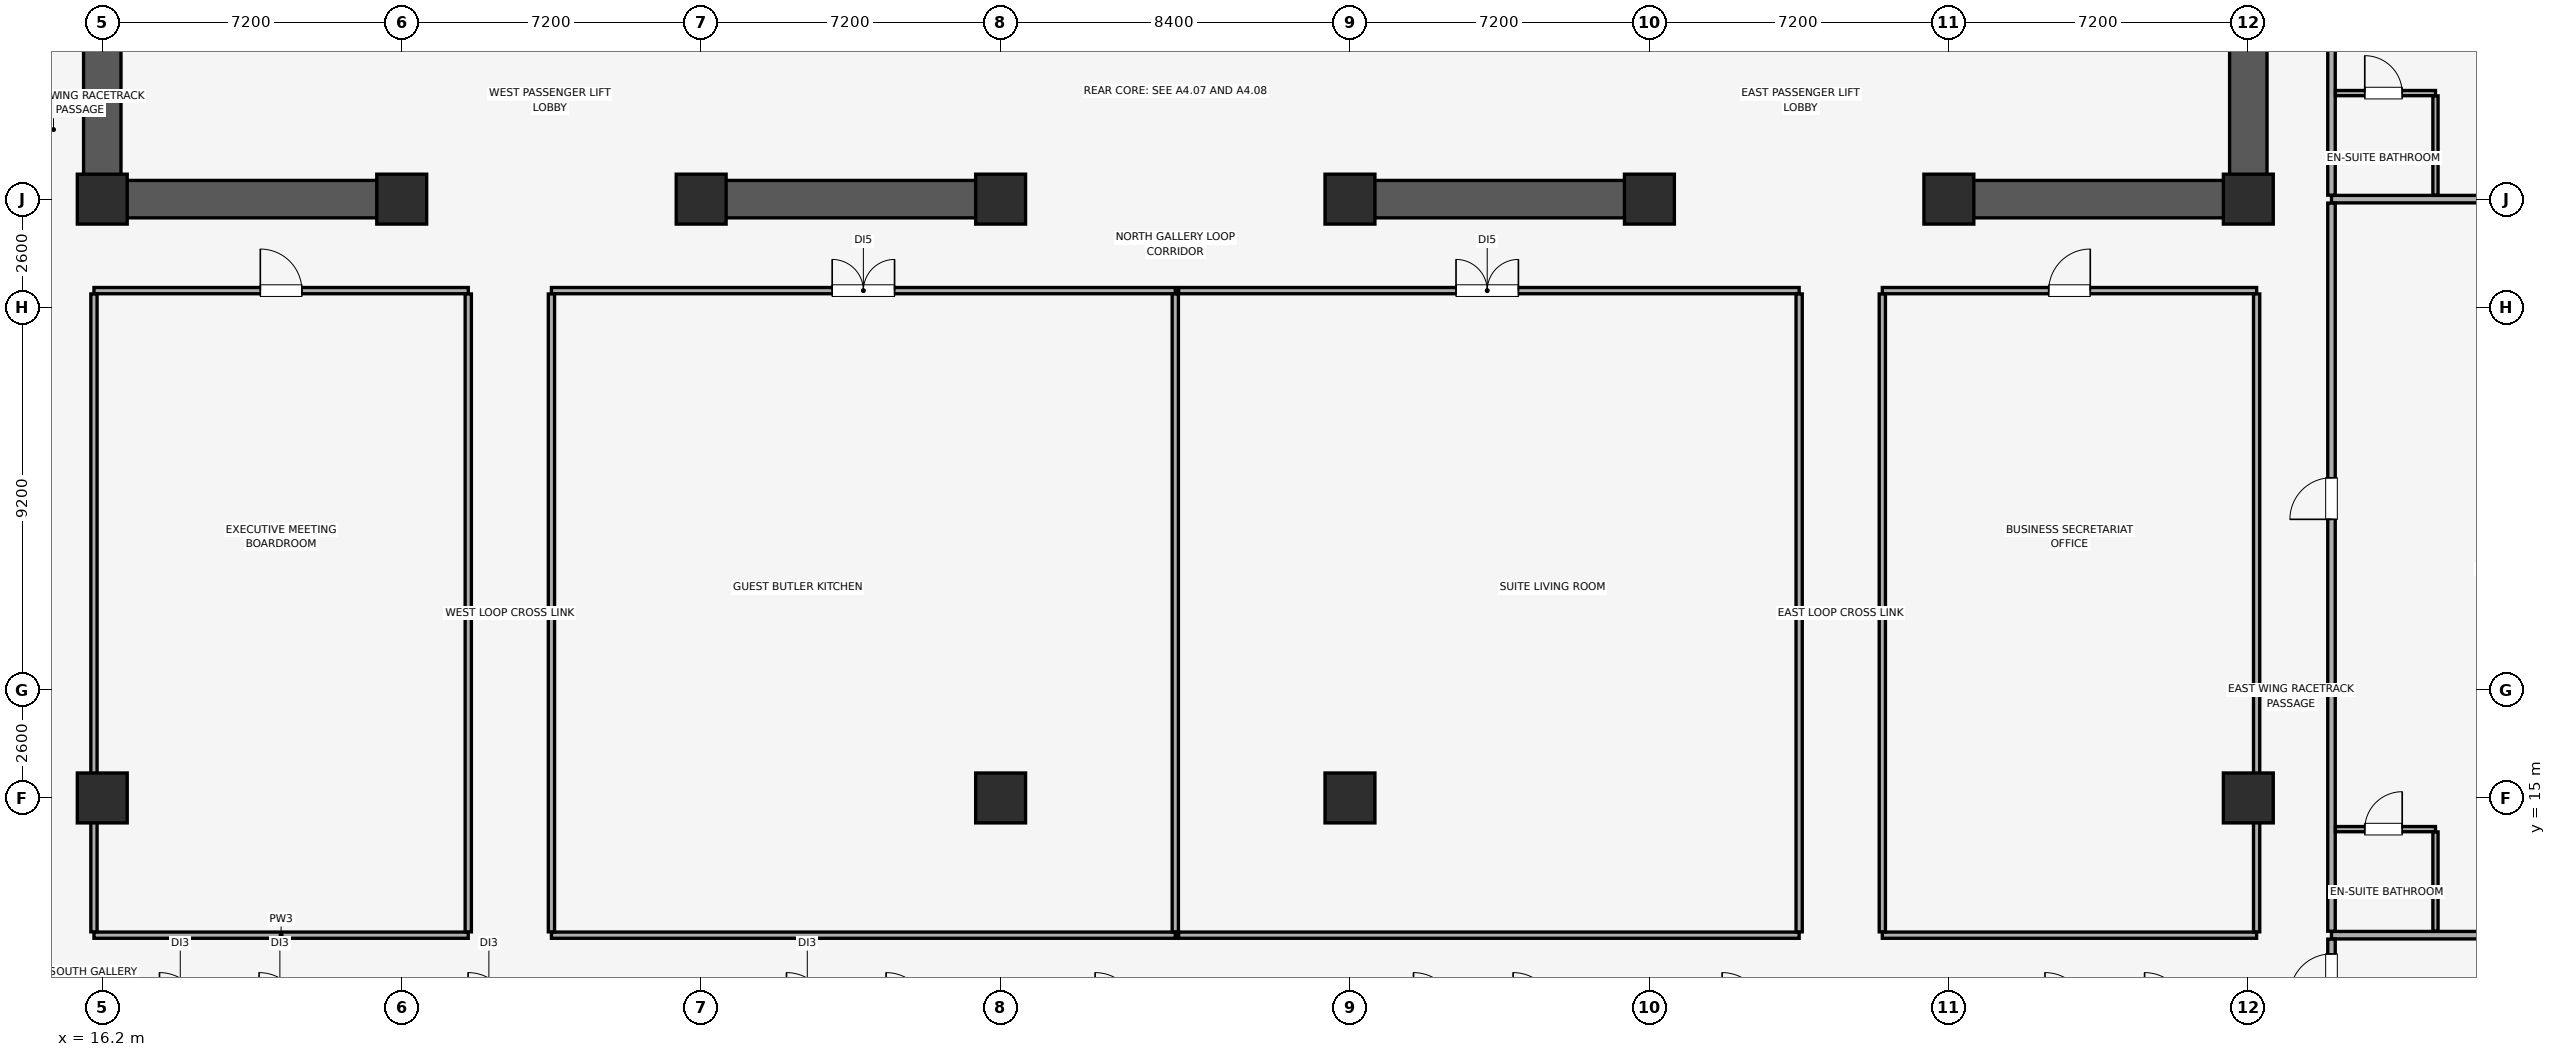
"""IFC4 building model, lengths in metres.
Left out: names, types, materials, properties, quantities, classifications, styles, units other than length and angle.
Written with IfcOpenShell. Run it as: python <this file> out.ifc"""

import sys

from ifc_helpers import new_model, si_unit, direction, frame, frame_2d, origin, origin_2d, place, context, subcontext, project, spatial, rectangle, extrude, element, fill, save


model = new_model("IFC4")
c1 = context("Model", 3, precision=1e-05, world=origin(), true_north=direction((0.0, 1.0)))
c2 = subcontext(c1, "Body", "Model", "MODEL_VIEW")
j1 = project(units=[si_unit("LENGTHUNIT", "METRE"), si_unit("PLANEANGLEUNIT", "RADIAN")], contexts=[c1])
p1 = place(None, origin())
s1 = spatial("IfcSite", under=j1, at=p1, CompositionType="ELEMENT")
p2 = place(p1, origin())
s2 = spatial("IfcBuilding", under=s1, at=p2, CompositionType="ELEMENT")
p3 = place(p2, frame((0.0, 0.0, 135.35)))
s3 = spatial("IfcBuildingStorey", under=s2, at=p3, CompositionType="ELEMENT", Elevation=135.35)
for number, where, z_axis, x_axis in (
    (1, (16.2, 15.0, 0.0), (0.0, 0.0, 1.0), (1.0, 0.0, 0.0)),
    (2, (37.8, 15.0, 0.0), (0.0, 0.0, 1.0), (1.0, 0.0, 0.0)),
    (3, (46.2, 15.0, 0.0), (0.0, 0.0, 1.0), (1.0, 0.0, 0.0)),
    (4, (67.8, 15.0, 0.0), (0.0, 0.0, 1.0), (1.0, 0.0, 0.0)),
    (5, (16.2, 29.4, 0.0), (0.0, 0.0, 1.0), (1.0, 0.0, 0.0)),
    (6, (23.4, 29.4, 0.0), (0.0, 0.0, 1.0), (1.0, 0.0, 0.0)),
    (7, (30.6, 29.4, 0.0), (0.0, 0.0, 1.0), (1.0, 0.0, 0.0)),
    (8, (37.8, 29.4, 0.0), (0.0, 0.0, 1.0), (1.0, 0.0, 0.0)),
    (9, (46.2, 29.4, 0.0), (0.0, 0.0, 1.0), (1.0, 0.0, 0.0)),
    (10, (53.4, 29.4, 0.0), (0.0, 0.0, 1.0), (1.0, 0.0, 0.0)),
    (11, (60.6, 29.4, 0.0), (0.0, 0.0, 1.0), (1.0, 0.0, 0.0)),
    (12, (67.8, 29.4, 0.0), (0.0, 0.0, 1.0), (1.0, 0.0, 0.0)),
):
    element("IfcColumn", number, at=place(p3, frame(where, z_axis=z_axis, x_axis=x_axis)), inside=s3, PredefinedType="COLUMN", context=c2, shape_type="SweptSolid", body=[
        extrude(rectangle(XDim=1.2, YDim=1.2, at=origin_2d()), origin(), (0.0, 0.0, 1.0), 3.56),
    ])
for number, where, z_axis, x_axis in (
    (13, (16.2, 29.4, 0.0), (0.0, 0.0, 1.0), (0.0, 1.0, 0.0)),
    (14, (67.8, 29.4, 0.0), (0.0, 0.0, 1.0), (0.0, 1.0, 0.0)),
):
    element("IfcWall", number, at=place(p3, frame(where, z_axis=z_axis, x_axis=x_axis)), inside=s3, PredefinedType="SHEAR", context=c2, shape_type="SweptSolid", body=[
        extrude(rectangle(XDim=19.2, YDim=0.9, at=frame_2d((9.6, 0.0))), origin(), (0.0, 0.0, 1.0), 3.56),
    ])
p4 = place(p3, frame((16.655, 29.4, 0.0), z_axis=(0.0, 0.0, 1.0), x_axis=(1.0, 0.0, 0.0)))
e15 = element("IfcWall", 15, at=p4, inside=s3, PredefinedType="SHEAR", context=c2, shape_type="SweptSolid", body=[
    extrude(rectangle(XDim=6.945, YDim=0.9, at=frame_2d((3.473, 0.0))), origin(), (0.0, 0.0, 1.0), 3.56),
])
for number, where, z_axis, x_axis in (
    (16, (30.4, 29.4, 0.0), (0.0, 0.0, 1.0), (1.0, 0.0, 0.0)),
    (17, (46.0, 29.4, 0.0), (0.0, 0.0, 1.0), (1.0, 0.0, 0.0)),
):
    element("IfcWall", number, at=place(p3, frame(where, z_axis=z_axis, x_axis=x_axis)), inside=s3, PredefinedType="SHEAR", context=c2, shape_type="SweptSolid", body=[
        extrude(rectangle(XDim=7.6, YDim=0.9, at=frame_2d((3.8, 0.0))), origin(), (0.0, 0.0, 1.0), 3.56),
    ])
p5 = place(p3, frame((60.4, 29.4, 0.0), z_axis=(0.0, 0.0, 1.0), x_axis=(1.0, 0.0, 0.0)))
e18 = element("IfcWall", 18, at=p5, inside=s3, PredefinedType="SHEAR", context=c2, shape_type="SweptSolid", body=[
    extrude(rectangle(XDim=6.945, YDim=0.9, at=frame_2d((3.473, 0.0))), origin(), (0.0, 0.0, 1.0), 3.56),
])
p6 = place(p3, frame((69.8, 11.7, 0.0), z_axis=(0.0, 0.0, 1.0), x_axis=(1.0, 0.0, 0.0)))
e19 = element("IfcWall", 19, at=p6, inside=s3, PredefinedType="PARTITIONING", context=c2, shape_type="SweptSolid", body=[
    extrude(rectangle(XDim=11.05, YDim=0.18, at=frame_2d((5.525, 0.0))), origin(), (0.0, 0.0, 1.0), 3.56),
])
p7 = place(p3, frame((69.8, 9.895, 0.0), z_axis=(0.0, 0.0, 1.0), x_axis=(0.0, 1.0, 0.0)))
e20 = element("IfcWall", 20, at=p7, inside=s3, PredefinedType="PARTITIONING", context=c2, shape_type="SweptSolid", body=[
    extrude(rectangle(XDim=1.71, YDim=0.18, at=frame_2d((0.855, 0.0))), origin(), (0.0, 0.0, 1.0), 3.56),
])
p8 = place(p7, frame((0.355, 0.0, 0.0)))
e21 = element("IfcOpeningElement", 21, at=p8, cuts=e20, PredefinedType="OPENING", context=c2, shape_type="SweptSolid", body=[
    extrude(rectangle(XDim=1.0, YDim=2.15, at=frame_2d((0.5, 1.075))), frame((0.0, 0.1, 0.0), z_axis=(0.0, -1.0, 0.0), x_axis=(1.0, 0.0, 0.0)), (0.0, 0.0, 1.0), 0.2),
])
p9 = place(p3, frame((69.8, 29.4, 0.0), z_axis=(0.0, 0.0, 1.0), x_axis=(1.0, 0.0, 0.0)))
e22 = element("IfcWall", 22, at=p9, inside=s3, PredefinedType="PARTITIONING", context=c2, shape_type="SweptSolid", body=[
    extrude(rectangle(XDim=11.05, YDim=0.18, at=frame_2d((5.525, 0.0))), origin(), (0.0, 0.0, 1.0), 2.91),
])
p10 = place(p3, frame((69.8, 11.795, 0.0), z_axis=(0.0, 0.0, 1.0), x_axis=(0.0, 1.0, 0.0)))
e23 = element("IfcWall", 23, at=p10, inside=s3, PredefinedType="PARTITIONING", context=c2, shape_type="SweptSolid", body=[
    extrude(rectangle(XDim=17.51, YDim=0.18, at=frame_2d((8.755, 0.0))), origin(), (0.0, 0.0, 1.0), 3.56),
])
p11 = place(p10, frame((9.905, 0.0, 0.0)))
e24 = element("IfcOpeningElement", 24, at=p11, cuts=e23, PredefinedType="OPENING", context=c2, shape_type="SweptSolid", body=[
    extrude(rectangle(XDim=1.0, YDim=2.15, at=frame_2d((0.5, 1.075))), frame((0.0, 0.1, 0.0), z_axis=(0.0, -1.0, 0.0), x_axis=(1.0, 0.0, 0.0)), (0.0, 0.0, 1.0), 0.2),
])
p12 = place(p3, frame((69.895, 14.25, 0.0), z_axis=(0.0, 0.0, 1.0), x_axis=(1.0, 0.0, 0.0)))
e25 = element("IfcWall", 25, at=p12, inside=s3, PredefinedType="PARTITIONING", context=c2, shape_type="SweptSolid", body=[
    extrude(rectangle(XDim=2.405, YDim=0.125, at=frame_2d((1.203, 0.0))), origin(), (0.0, 0.0, 1.0), 3.56),
])
p13 = place(p12, frame((0.705, 0.0, 0.0)))
e26 = element("IfcOpeningElement", 26, at=p13, cuts=e25, PredefinedType="OPENING", context=c2, shape_type="SweptSolid", body=[
    extrude(rectangle(XDim=0.9, YDim=2.1, at=frame_2d((0.45, 1.05))), frame((0.0, 0.073, 0.0), z_axis=(0.0, -1.0, 0.0), x_axis=(1.0, 0.0, 0.0)), (0.0, 0.0, 1.0), 0.145),
])
p14 = place(p3, frame((72.3, 11.795, 0.0), z_axis=(0.0, 0.0, 1.0), x_axis=(0.0, 1.0, 0.0)))
e27 = element("IfcWall", 27, at=p14, inside=s3, PredefinedType="PARTITIONING", context=c2, shape_type="SweptSolid", body=[
    extrude(rectangle(XDim=2.388, YDim=0.125, at=frame_2d((1.194, 0.0))), origin(), (0.0, 0.0, 1.0), 3.56),
])
p15 = place(p3, frame((16.0, 11.7, 0.0), z_axis=(0.0, 0.0, 1.0), x_axis=(1.0, 0.0, 0.0)))
e28 = element("IfcWall", 28, at=p15, inside=s3, PredefinedType="PARTITIONING", context=c2, shape_type="SweptSolid", body=[
    extrude(rectangle(XDim=9.0, YDim=0.15, at=frame_2d((4.5, 0.0))), origin(), (0.0, 0.0, 1.0), 3.56),
])
p16 = place(p3, frame((16.0, 27.2, 0.0), z_axis=(0.0, 0.0, 1.0), x_axis=(1.0, 0.0, 0.0)))
e29 = element("IfcWall", 29, at=p16, inside=s3, PredefinedType="PARTITIONING", context=c2, shape_type="SweptSolid", body=[
    extrude(rectangle(XDim=9.0, YDim=0.15, at=frame_2d((4.5, 0.0))), origin(), (0.0, 0.0, 1.0), 3.56),
])
p17 = place(p16, frame((4.0, 0.0, 0.0)))
e30 = element("IfcOpeningElement", 30, at=p17, cuts=e29, PredefinedType="OPENING", context=c2, shape_type="SweptSolid", body=[
    extrude(rectangle(XDim=1.0, YDim=2.15, at=frame_2d((0.5, 1.075))), frame((0.0, 0.085, 0.0), z_axis=(0.0, -1.0, 0.0), x_axis=(1.0, 0.0, 0.0)), (0.0, 0.0, 1.0), 0.17),
])
p18 = place(p3, frame((16.0, 11.78, 0.0), z_axis=(0.0, 0.0, 1.0), x_axis=(0.0, 1.0, 0.0)))
e31 = element("IfcWall", 31, at=p18, inside=s3, PredefinedType="PARTITIONING", context=c2, shape_type="SweptSolid", body=[
    extrude(rectangle(XDim=15.34, YDim=0.15, at=frame_2d((7.67, 0.0))), origin(), (0.0, 0.0, 1.0), 3.01),
])
p19 = place(p3, frame((25.0, 11.78, 0.0), z_axis=(0.0, 0.0, 1.0), x_axis=(0.0, 1.0, 0.0)))
e32 = element("IfcWall", 32, at=p19, inside=s3, PredefinedType="PARTITIONING", context=c2, shape_type="SweptSolid", body=[
    extrude(rectangle(XDim=15.34, YDim=0.15, at=frame_2d((7.67, 0.0))), origin(), (0.0, 0.0, 1.0), 3.56),
])
p20 = place(p3, frame((27.0, 11.7, 0.0), z_axis=(0.0, 0.0, 1.0), x_axis=(1.0, 0.0, 0.0)))
e33 = element("IfcWall", 33, at=p20, inside=s3, PredefinedType="PARTITIONING", context=c2, shape_type="SweptSolid", body=[
    extrude(rectangle(XDim=15.0, YDim=0.15, at=frame_2d((7.5, 0.0))), origin(), (0.0, 0.0, 1.0), 3.56),
])
p21 = place(p3, frame((27.0, 27.2, 0.0), z_axis=(0.0, 0.0, 1.0), x_axis=(1.0, 0.0, 0.0)))
e34 = element("IfcWall", 34, at=p21, inside=s3, PredefinedType="PARTITIONING", context=c2, shape_type="SweptSolid", body=[
    extrude(rectangle(XDim=15.0, YDim=0.15, at=frame_2d((7.5, 0.0))), origin(), (0.0, 0.0, 1.0), 3.56),
])
p22 = place(p21, frame((6.75, 0.0, 0.0)))
e35 = element("IfcOpeningElement", 35, at=p22, cuts=e34, PredefinedType="OPENING", context=c2, shape_type="SweptSolid", body=[
    extrude(rectangle(XDim=1.5, YDim=2.25, at=frame_2d((0.75, 1.125))), frame((0.0, 0.085, 0.0), z_axis=(0.0, -1.0, 0.0), x_axis=(1.0, 0.0, 0.0)), (0.0, 0.0, 1.0), 0.17),
])
for number, where, z_axis, x_axis in (
    (36, (27.0, 11.78, 0.0), (0.0, 0.0, 1.0), (0.0, 1.0, 0.0)),
    (37, (42.0, 11.78, 0.0), (0.0, 0.0, 1.0), (0.0, 1.0, 0.0)),
):
    element("IfcWall", number, at=place(p3, frame(where, z_axis=z_axis, x_axis=x_axis)), inside=s3, PredefinedType="PARTITIONING", context=c2, shape_type="SweptSolid", body=[
        extrude(rectangle(XDim=15.34, YDim=0.15, at=frame_2d((7.67, 0.0))), origin(), (0.0, 0.0, 1.0), 3.01),
    ])
p23 = place(p3, frame((42.08, 11.7, 0.0), z_axis=(0.0, 0.0, 1.0), x_axis=(1.0, 0.0, 0.0)))
e38 = element("IfcWall", 38, at=p23, inside=s3, PredefinedType="PARTITIONING", context=c2, shape_type="SweptSolid", body=[
    extrude(rectangle(XDim=14.92, YDim=0.15, at=frame_2d((7.46, 0.0))), origin(), (0.0, 0.0, 1.0), 3.56),
])
p24 = place(p3, frame((42.08, 27.2, 0.0), z_axis=(0.0, 0.0, 1.0), x_axis=(1.0, 0.0, 0.0)))
e39 = element("IfcWall", 39, at=p24, inside=s3, PredefinedType="PARTITIONING", context=c2, shape_type="SweptSolid", body=[
    extrude(rectangle(XDim=14.92, YDim=0.15, at=frame_2d((7.46, 0.0))), origin(), (0.0, 0.0, 1.0), 3.56),
])
p25 = place(p24, frame((6.67, 0.0, 0.0)))
e40 = element("IfcOpeningElement", 40, at=p25, cuts=e39, PredefinedType="OPENING", context=c2, shape_type="SweptSolid", body=[
    extrude(rectangle(XDim=1.5, YDim=2.25, at=frame_2d((0.75, 1.125))), frame((0.0, 0.085, 0.0), z_axis=(0.0, -1.0, 0.0), x_axis=(1.0, 0.0, 0.0)), (0.0, 0.0, 1.0), 0.17),
])
p26 = place(p3, frame((57.0, 11.78, 0.0), z_axis=(0.0, 0.0, 1.0), x_axis=(0.0, 1.0, 0.0)))
e41 = element("IfcWall", 41, at=p26, inside=s3, PredefinedType="PARTITIONING", context=c2, shape_type="SweptSolid", body=[
    extrude(rectangle(XDim=15.34, YDim=0.15, at=frame_2d((7.67, 0.0))), origin(), (0.0, 0.0, 1.0), 3.01),
])
p27 = place(p3, frame((59.0, 11.7, 0.0), z_axis=(0.0, 0.0, 1.0), x_axis=(1.0, 0.0, 0.0)))
e42 = element("IfcWall", 42, at=p27, inside=s3, PredefinedType="PARTITIONING", context=c2, shape_type="SweptSolid", body=[
    extrude(rectangle(XDim=9.0, YDim=0.15, at=frame_2d((4.5, 0.0))), origin(), (0.0, 0.0, 1.0), 3.56),
])
p28 = place(p3, frame((59.0, 27.2, 0.0), z_axis=(0.0, 0.0, 1.0), x_axis=(1.0, 0.0, 0.0)))
e43 = element("IfcWall", 43, at=p28, inside=s3, PredefinedType="PARTITIONING", context=c2, shape_type="SweptSolid", body=[
    extrude(rectangle(XDim=9.0, YDim=0.15, at=frame_2d((4.5, 0.0))), origin(), (0.0, 0.0, 1.0), 3.56),
])
p29 = place(p28, frame((4.0, 0.0, 0.0)))
e44 = element("IfcOpeningElement", 44, at=p29, cuts=e43, PredefinedType="OPENING", context=c2, shape_type="SweptSolid", body=[
    extrude(rectangle(XDim=1.0, YDim=2.15, at=frame_2d((0.5, 1.075))), frame((0.0, 0.085, 0.0), z_axis=(0.0, -1.0, 0.0), x_axis=(1.0, 0.0, 0.0)), (0.0, 0.0, 1.0), 0.17),
])
p30 = place(p3, frame((59.0, 11.78, 0.0), z_axis=(0.0, 0.0, 1.0), x_axis=(0.0, 1.0, 0.0)))
e45 = element("IfcWall", 45, at=p30, inside=s3, PredefinedType="PARTITIONING", context=c2, shape_type="SweptSolid", body=[
    extrude(rectangle(XDim=15.34, YDim=0.15, at=frame_2d((7.67, 0.0))), origin(), (0.0, 0.0, 1.0), 3.56),
])
p31 = place(p3, frame((68.0, 11.78, 0.0), z_axis=(0.0, 0.0, 1.0), x_axis=(0.0, 1.0, 0.0)))
e46 = element("IfcWall", 46, at=p31, inside=s3, PredefinedType="PARTITIONING", context=c2, shape_type="SweptSolid", body=[
    extrude(rectangle(XDim=15.34, YDim=0.15, at=frame_2d((7.67, 0.0))), origin(), (0.0, 0.0, 1.0), 3.01),
])
p32 = place(p3, frame((69.8, 29.495, 0.0), z_axis=(0.0, 0.0, 1.0), x_axis=(0.0, 1.0, 0.0)))
e47 = element("IfcWall", 47, at=p32, inside=s3, PredefinedType="PARTITIONING", context=c2, shape_type="SweptSolid", body=[
    extrude(rectangle(XDim=10.26, YDim=0.18, at=frame_2d((5.13, 0.0))), origin(), (0.0, 0.0, 1.0), 3.56),
])
p33 = place(p32, frame((5.84, 0.0, 0.0)))
e48 = element("IfcOpeningElement", 48, at=p33, cuts=e47, PredefinedType="OPENING", context=c2, shape_type="SweptSolid", body=[
    extrude(rectangle(XDim=1.0, YDim=2.15, at=frame_2d((0.5, 1.075))), frame((0.0, 0.1, 0.0), z_axis=(0.0, -1.0, 0.0), x_axis=(1.0, 0.0, 0.0)), (0.0, 0.0, 1.0), 0.2),
])
p34 = place(p3, frame((69.895, 31.95, 0.0), z_axis=(0.0, 0.0, 1.0), x_axis=(1.0, 0.0, 0.0)))
e49 = element("IfcWall", 49, at=p34, inside=s3, PredefinedType="PARTITIONING", context=c2, shape_type="SweptSolid", body=[
    extrude(rectangle(XDim=2.405, YDim=0.125, at=frame_2d((1.203, 0.0))), origin(), (0.0, 0.0, 1.0), 3.56),
])
p35 = place(p34, frame((0.705, 0.0, 0.0)))
e50 = element("IfcOpeningElement", 50, at=p35, cuts=e49, PredefinedType="OPENING", context=c2, shape_type="SweptSolid", body=[
    extrude(rectangle(XDim=0.9, YDim=2.1, at=frame_2d((0.45, 1.05))), frame((0.0, 0.073, 0.0), z_axis=(0.0, -1.0, 0.0), x_axis=(1.0, 0.0, 0.0)), (0.0, 0.0, 1.0), 0.145),
])
p36 = place(p3, frame((72.3, 29.495, 0.0), z_axis=(0.0, 0.0, 1.0), x_axis=(0.0, 1.0, 0.0)))
e51 = element("IfcWall", 51, at=p36, inside=s3, PredefinedType="PARTITIONING", context=c2, shape_type="SweptSolid", body=[
    extrude(rectangle(XDim=2.387, YDim=0.125, at=frame_2d((1.194, 0.0))), origin(), (0.0, 0.0, 1.0), 3.56),
])
p37 = place(p8, origin())
e52 = element("IfcDoor", 52, at=p37, inside=s3, OperationType="SINGLE_SWING_LEFT", PredefinedType="DOOR", context=c2, shape_type="SweptSolid", body=[
    extrude(rectangle(XDim=1.0, YDim=2.15, at=frame_2d((0.5, 1.075))), frame((0.0, 0.025, 0.0), z_axis=(0.0, -1.0, 0.0), x_axis=(1.0, 0.0, 0.0)), (0.0, 0.0, 1.0), 0.05),
])
fill(e21, e52)
p38 = place(p11, origin())
e53 = element("IfcDoor", 53, at=p38, inside=s3, OperationType="SINGLE_SWING_LEFT", PredefinedType="DOOR", context=c2, shape_type="SweptSolid", body=[
    extrude(rectangle(XDim=1.0, YDim=2.15, at=frame_2d((0.5, 1.075))), frame((0.0, 0.025, 0.0), z_axis=(0.0, -1.0, 0.0), x_axis=(1.0, 0.0, 0.0)), (0.0, 0.0, 1.0), 0.05),
])
fill(e24, e53)
p39 = place(p13, origin())
e54 = element("IfcDoor", 54, at=p39, inside=s3, OperationType="SINGLE_SWING_RIGHT", PredefinedType="DOOR", context=c2, shape_type="SweptSolid", body=[
    extrude(rectangle(XDim=0.9, YDim=2.1, at=frame_2d((0.45, 1.05))), frame((0.0, 0.025, 0.0), z_axis=(0.0, -1.0, 0.0), x_axis=(1.0, 0.0, 0.0)), (0.0, 0.0, 1.0), 0.05),
])
fill(e26, e54)
p40 = place(p17, origin())
e55 = element("IfcDoor", 55, at=p40, inside=s3, OperationType="SINGLE_SWING_LEFT", PredefinedType="DOOR", context=c2, shape_type="SweptSolid", body=[
    extrude(rectangle(XDim=1.0, YDim=2.15, at=frame_2d((0.5, 1.075))), frame((0.0, 0.025, 0.0), z_axis=(0.0, -1.0, 0.0), x_axis=(1.0, 0.0, 0.0)), (0.0, 0.0, 1.0), 0.05),
])
fill(e30, e55)
p41 = place(p22, origin())
e56 = element("IfcDoor", 56, at=p41, inside=s3, OperationType="DOUBLE_DOOR_SINGLE_SWING", PredefinedType="DOOR", context=c2, shape_type="SweptSolid", body=[
    extrude(rectangle(XDim=1.5, YDim=2.25, at=frame_2d((0.75, 1.125))), frame((0.0, 0.025, 0.0), z_axis=(0.0, -1.0, 0.0), x_axis=(1.0, 0.0, 0.0)), (0.0, 0.0, 1.0), 0.05),
])
fill(e35, e56)
p42 = place(p25, origin())
e57 = element("IfcDoor", 57, at=p42, inside=s3, OperationType="DOUBLE_DOOR_SINGLE_SWING", PredefinedType="DOOR", context=c2, shape_type="SweptSolid", body=[
    extrude(rectangle(XDim=1.5, YDim=2.25, at=frame_2d((0.75, 1.125))), frame((0.0, 0.025, 0.0), z_axis=(0.0, -1.0, 0.0), x_axis=(1.0, 0.0, 0.0)), (0.0, 0.0, 1.0), 0.05),
])
fill(e40, e57)
p43 = place(p29, origin())
e58 = element("IfcDoor", 58, at=p43, inside=s3, OperationType="SINGLE_SWING_RIGHT", PredefinedType="DOOR", context=c2, shape_type="SweptSolid", body=[
    extrude(rectangle(XDim=1.0, YDim=2.15, at=frame_2d((0.5, 1.075))), frame((0.0, 0.025, 0.0), z_axis=(0.0, -1.0, 0.0), x_axis=(1.0, 0.0, 0.0)), (0.0, 0.0, 1.0), 0.05),
])
fill(e44, e58)
p44 = place(p35, origin())
e59 = element("IfcDoor", 59, at=p44, inside=s3, OperationType="SINGLE_SWING_LEFT", PredefinedType="DOOR", context=c2, shape_type="SweptSolid", body=[
    extrude(rectangle(XDim=0.9, YDim=2.1, at=frame_2d((0.45, 1.05))), frame((0.0, 0.025, 0.0), z_axis=(0.0, -1.0, 0.0), x_axis=(1.0, 0.0, 0.0)), (0.0, 0.0, 1.0), 0.05),
])
fill(e50, e59)
save(model, sys.argv[1])
